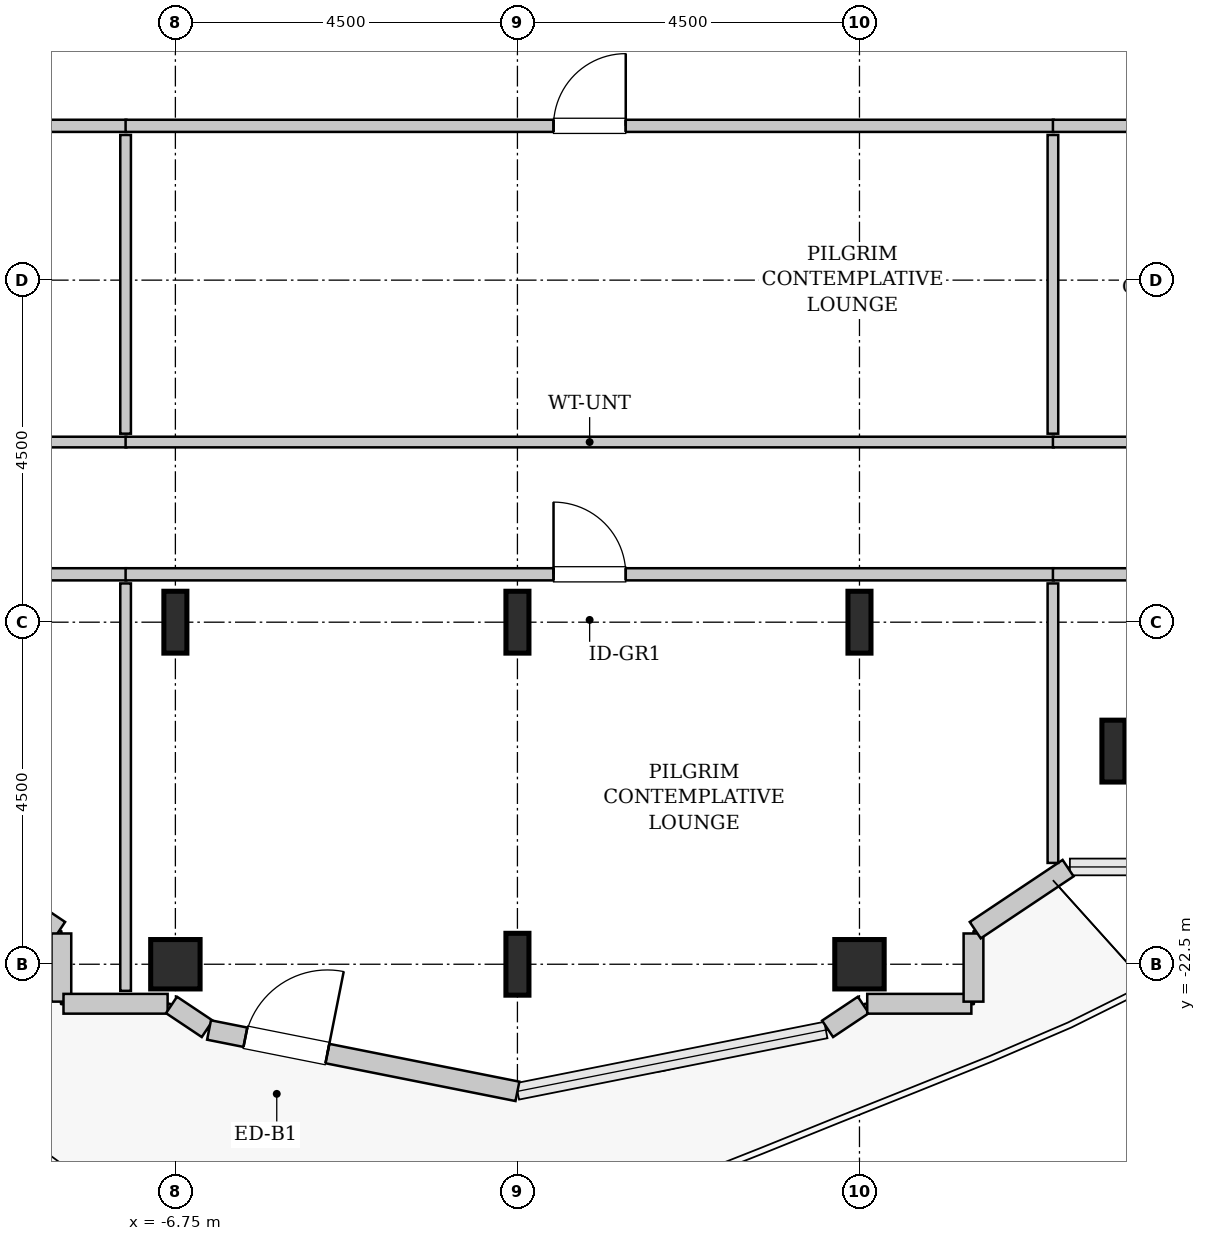
"""IFC4 building model, lengths in metres.
Left out: names, types, materials, properties, quantities, classifications, styles, units other than length and angle.
Written with IfcOpenShell. Run it as: python <this file> out.ifc"""

import sys

from ifc_helpers import new_model, si_unit, direction, frame, frame_2d, origin, origin_2d, place, context, subcontext, project, spatial, rectangle, hollow_rectangle, i_section, extrude, source, transform, mapped, element, fill, save


model = new_model("IFC4")
c1 = context("Model", 3, precision=1e-05, world=origin(), true_north=direction((0.0, 1.0)))
c2 = subcontext(c1, "Body", "Model", "MODEL_VIEW")
j1 = project(units=[si_unit("LENGTHUNIT", "METRE"), si_unit("PLANEANGLEUNIT", "RADIAN")], contexts=[c1])
p1 = place(None, origin())
s1 = spatial("IfcSite", under=j1, at=p1, CompositionType="ELEMENT")
p2 = place(p1, origin())
s2 = spatial("IfcBuilding", under=s1, at=p2, CompositionType="ELEMENT")
p3 = place(p2, frame((0.0, 0.0, 240.8)))
s3 = spatial("IfcBuildingStorey", under=s2, at=p3, CompositionType="ELEMENT", Elevation=240.8)
m1 = source(origin(), c2, "Body", "SweptSolid", [
    extrude(hollow_rectangle(XDim=0.65, YDim=0.65, WallThickness=0.032, InnerFilletRadius=0.032, OuterFilletRadius=0.064, at=origin_2d()), origin(), (0.0, 0.0, 1.0), 3.8),
])
p4 = place(p3, frame((-6.75, -22.5, 0.0), z_axis=(0.0, 0.0, 1.0), x_axis=(1.0, 0.0, 0.0)))
e1 = element("IfcColumn", 1, at=p4, inside=s3, PredefinedType="COLUMN", context=c2, shape_type="MappedRepresentation", body=[
    mapped(m1, transform((0.0, 0.0, 0.0), x_axis=(1.0, 0.0, 0.0), y_axis=(0.0, 1.0, 0.0), z_axis=(0.0, 0.0, 1.0), scale=1.0)),
])
m2 = source(origin(), c2, "Body", "SweptSolid", [
    extrude(i_section(OverallWidth=0.303, OverallDepth=0.814, WebThickness=0.021, FlangeThickness=0.04, FilletRadius=0.03, at=origin_2d()), origin(), (0.0, 0.0, 1.0), 3.8),
])
for number, where, z_axis, x_axis in (
    (2, (-6.75, -18.0, 0.0), (0.0, 0.0, 1.0), (1.0, 0.0, 0.0)),
    (3, (-2.25, -22.5, 0.0), (0.0, 0.0, 1.0), (1.0, 0.0, 0.0)),
    (4, (-2.25, -18.0, 0.0), (0.0, 0.0, 1.0), (1.0, 0.0, 0.0)),
):
    element("IfcColumn", number, at=place(p3, frame(where, z_axis=z_axis, x_axis=x_axis)), inside=s3, PredefinedType="COLUMN", context=c2, shape_type="MappedRepresentation", body=[
        mapped(m2, transform((0.0, 0.0, 0.0), x_axis=(1.0, 0.0, 0.0), y_axis=(0.0, 1.0, 0.0), z_axis=(0.0, 0.0, 1.0), scale=1.0)),
    ])
p5 = place(p3, frame((2.25, -22.5, 0.0), z_axis=(0.0, 0.0, 1.0), x_axis=(1.0, 0.0, 0.0)))
e5 = element("IfcColumn", 5, at=p5, inside=s3, PredefinedType="COLUMN", context=c2, shape_type="MappedRepresentation", body=[
    mapped(m1, transform((0.0, 0.0, 0.0), x_axis=(1.0, 0.0, 0.0), y_axis=(0.0, 1.0, 0.0), z_axis=(0.0, 0.0, 1.0), scale=1.0)),
])
for number, where, z_axis, x_axis in (
    (6, (2.25, -18.0, 0.0), (0.0, 0.0, 1.0), (1.0, 0.0, 0.0)),
    (7, (5.591, -19.696, 0.0), (0.0, 0.0, 1.0), (1.0, 0.0, 0.0)),
):
    element("IfcColumn", number, at=place(p3, frame(where, z_axis=z_axis, x_axis=x_axis)), inside=s3, PredefinedType="COLUMN", context=c2, shape_type="MappedRepresentation", body=[
        mapped(m2, transform((0.0, 0.0, 0.0), x_axis=(1.0, 0.0, 0.0), y_axis=(0.0, 1.0, 0.0), z_axis=(0.0, 0.0, 1.0), scale=1.0)),
    ])
m3 = source(origin(), c2, "Body", "SweptSolid", [
    extrude(rectangle(XDim=1.469, YDim=0.26, at=frame_2d((0.734, 0.0))), origin(), (0.0, 0.0, 1.0), 3.55),
])
p6 = place(p3, frame((-9.495, -21.236, 0.0), z_axis=(0.0, 0.0, 1.0), x_axis=(0.831461760506, -0.555581983884, 0.0)))
e8 = element("IfcWall", 8, at=p6, inside=s3, PredefinedType="SOLIDWALL", context=c2, shape_type="MappedRepresentation", body=[
    mapped(m3, transform((0.0, 0.0, 0.0), x_axis=(1.0, 0.0, 0.0), y_axis=(0.0, 1.0, 0.0), z_axis=(0.0, 0.0, 1.0), scale=1.0)),
])
m4 = source(origin(), c2, "Body", "SweptSolid", [
    extrude(rectangle(XDim=0.897, YDim=0.26, at=frame_2d((0.448, 0.0))), origin(), (0.0, 0.0, 1.0), 3.55),
])
p7 = place(p3, frame((-8.25, -22.095, 0.0), z_axis=(0.0, 0.0, 1.0), x_axis=(0.0, -1.0, 0.0)))
e9 = element("IfcWall", 9, at=p7, inside=s3, PredefinedType="SOLIDWALL", context=c2, shape_type="MappedRepresentation", body=[
    mapped(m4, transform((0.0, 0.0, 0.0), x_axis=(1.0, 0.0, 0.0), y_axis=(0.0, 1.0, 0.0), z_axis=(0.0, 0.0, 1.0), scale=1.0)),
])
m5 = source(origin(), c2, "Body", "SweptSolid", [
    extrude(rectangle(XDim=1.37, YDim=0.26, at=frame_2d((0.685, 0.0))), origin(), (0.0, 0.0, 1.0), 3.55),
])
p8 = place(p3, frame((-8.222, -23.02, 0.0), z_axis=(0.0, 0.0, 1.0), x_axis=(1.0, 0.0, 0.0)))
e10 = element("IfcWall", 10, at=p8, inside=s3, PredefinedType="SOLIDWALL", context=c2, shape_type="MappedRepresentation", body=[
    mapped(m5, transform((0.0, 0.0, 0.0), x_axis=(1.0, 0.0, 0.0), y_axis=(0.0, 1.0, 0.0), z_axis=(0.0, 0.0, 1.0), scale=1.0)),
])
m6 = source(origin(), c2, "Body", "SweptSolid", [
    extrude(rectangle(XDim=0.565, YDim=0.26, at=frame_2d((0.283, 0.0))), origin(), (0.0, 0.0, 1.0), 3.55),
])
p9 = place(p3, frame((-6.801, -23.036, 0.0), z_axis=(0.0, 0.0, 1.0), x_axis=(0.831651492666, -0.555297933317, 0.0)))
e11 = element("IfcWall", 11, at=p9, inside=s3, PredefinedType="SOLIDWALL", context=c2, shape_type="MappedRepresentation", body=[
    mapped(m6, transform((0.0, 0.0, 0.0), x_axis=(1.0, 0.0, 0.0), y_axis=(0.0, 1.0, 0.0), z_axis=(0.0, 0.0, 1.0), scale=1.0)),
])
m7 = source(origin(), c2, "Body", "SweptSolid", [
    extrude(rectangle(XDim=4.137, YDim=0.26, at=frame_2d((2.068, 0.0))), origin(), (0.0, 0.0, 1.0), 3.55),
])
p10 = place(p3, frame((-6.307, -23.365, 0.0), z_axis=(0.0, 0.0, 1.0), x_axis=(0.980782170794, -0.195105954428, 0.0)))
e12 = element("IfcWall", 12, at=p10, inside=s3, PredefinedType="SOLIDWALL", context=c2, shape_type="MappedRepresentation", body=[
    mapped(m7, transform((0.0, 0.0, 0.0), x_axis=(1.0, 0.0, 0.0), y_axis=(0.0, 1.0, 0.0), z_axis=(0.0, 0.0, 1.0), scale=1.0)),
])
p11 = place(p10, frame((0.488, 0.0, 0.0)))
e13 = element("IfcOpeningElement", 13, at=p11, cuts=e12, PredefinedType="OPENING", context=c2, shape_type="SweptSolid", body=[
    extrude(rectangle(XDim=1.1, YDim=2.2, at=frame_2d((0.55, 1.1))), frame((0.0, 0.14, 0.0), z_axis=(0.0, -1.0, 0.0), x_axis=(1.0, 0.0, 0.0)), (0.0, 0.0, 1.0), 0.28),
])
p12 = place(p3, frame((1.831, -23.35, 0.0), z_axis=(0.0, 0.0, 1.0), x_axis=(0.831651492666, 0.555297933317, 0.0)))
e14 = element("IfcWall", 14, at=p12, inside=s3, PredefinedType="SOLIDWALL", context=c2, shape_type="MappedRepresentation", body=[
    mapped(m6, transform((0.0, 0.0, 0.0), x_axis=(1.0, 0.0, 0.0), y_axis=(0.0, 1.0, 0.0), z_axis=(0.0, 0.0, 1.0), scale=1.0)),
])
p13 = place(p3, frame((2.352, -23.02, 0.0), z_axis=(0.0, 0.0, 1.0), x_axis=(1.0, 0.0, 0.0)))
e15 = element("IfcWall", 15, at=p13, inside=s3, PredefinedType="SOLIDWALL", context=c2, shape_type="MappedRepresentation", body=[
    mapped(m5, transform((0.0, 0.0, 0.0), x_axis=(1.0, 0.0, 0.0), y_axis=(0.0, 1.0, 0.0), z_axis=(0.0, 0.0, 1.0), scale=1.0)),
])
p14 = place(p3, frame((3.75, -22.992, 0.0), z_axis=(0.0, 0.0, 1.0), x_axis=(0.0, 1.0, 0.0)))
e16 = element("IfcWall", 16, at=p14, inside=s3, PredefinedType="SOLIDWALL", context=c2, shape_type="MappedRepresentation", body=[
    mapped(m4, transform((0.0, 0.0, 0.0), x_axis=(1.0, 0.0, 0.0), y_axis=(0.0, 1.0, 0.0), z_axis=(0.0, 0.0, 1.0), scale=1.0)),
])
p15 = place(p3, frame((3.773, -22.052, 0.0), z_axis=(0.0, 0.0, 1.0), x_axis=(0.831461760506, 0.555581983884, 0.0)))
e17 = element("IfcWall", 17, at=p15, inside=s3, PredefinedType="SOLIDWALL", context=c2, shape_type="MappedRepresentation", body=[
    mapped(m3, transform((0.0, 0.0, 0.0), x_axis=(1.0, 0.0, 0.0), y_axis=(0.0, 1.0, 0.0), z_axis=(0.0, 0.0, 1.0), scale=1.0)),
])
m8 = source(origin(), c2, "Body", "SweptSolid", [
    extrude(rectangle(XDim=6.225, YDim=0.16, at=frame_2d((3.113, 0.0))), origin(), (0.0, 0.0, 1.0), 3.535),
])
p16 = place(p3, frame((-13.62, -17.37, 0.0), z_axis=(0.0, 0.0, 1.0), x_axis=(1.0, 0.0, 0.0)))
e18 = element("IfcWall", 18, at=p16, inside=s3, PredefinedType="PARTITIONING", context=c2, shape_type="MappedRepresentation", body=[
    mapped(m8, transform((0.0, 0.0, 0.0), x_axis=(1.0, 0.0, 0.0), y_axis=(0.0, 1.0, 0.0), z_axis=(0.0, 0.0, 1.0), scale=1.0)),
])
p17 = place(p16, frame((3.015, 0.0, 0.0)))
e19 = element("IfcOpeningElement", 19, at=p17, cuts=e18, PredefinedType="OPENING", context=c2, shape_type="SweptSolid", body=[
    extrude(rectangle(XDim=0.95, YDim=2.1, at=frame_2d((0.475, 1.05))), frame((0.0, 0.09, 0.0), z_axis=(0.0, -1.0, 0.0), x_axis=(1.0, 0.0, 0.0)), (0.0, 0.0, 1.0), 0.18),
])
m9 = source(origin(), c2, "Body", "SweptSolid", [
    extrude(rectangle(XDim=5.36, YDim=0.14, at=frame_2d((2.68, 0.0))), origin(), (0.0, 0.0, 1.0), 3.535),
])
p18 = place(p3, frame((-7.405, -22.85, 0.0), z_axis=(0.0, 0.0, 1.0), x_axis=(0.0, 1.0, 0.0)))
e20 = element("IfcWall", 20, at=p18, inside=s3, PredefinedType="PARTITIONING", context=c2, shape_type="MappedRepresentation", body=[
    mapped(m9, transform((0.0, 0.0, 0.0), x_axis=(1.0, 0.0, 0.0), y_axis=(0.0, 1.0, 0.0), z_axis=(0.0, 0.0, 1.0), scale=1.0)),
])
m10 = source(origin(), c2, "Body", "SweptSolid", [
    extrude(rectangle(XDim=4.615, YDim=0.16, at=frame_2d((2.308, 0.0))), origin(), (0.0, 0.0, 1.0), 3.535),
])
p19 = place(p3, frame((-12.01, -11.47, 0.0), z_axis=(0.0, 0.0, 1.0), x_axis=(1.0, 0.0, 0.0)))
e21 = element("IfcWall", 21, at=p19, inside=s3, PredefinedType="PARTITIONING", context=c2, shape_type="MappedRepresentation", body=[
    mapped(m10, transform((0.0, 0.0, 0.0), x_axis=(1.0, 0.0, 0.0), y_axis=(0.0, 1.0, 0.0), z_axis=(0.0, 0.0, 1.0), scale=1.0)),
])
p20 = place(p19, frame((1.833, 0.0, 0.0)))
e22 = element("IfcOpeningElement", 22, at=p20, cuts=e21, PredefinedType="OPENING", context=c2, shape_type="SweptSolid", body=[
    extrude(rectangle(XDim=0.95, YDim=2.1, at=frame_2d((0.475, 1.05))), frame((0.0, 0.09, 0.0), z_axis=(0.0, -1.0, 0.0), x_axis=(1.0, 0.0, 0.0)), (0.0, 0.0, 1.0), 0.18),
])
m11 = source(origin(), c2, "Body", "SweptSolid", [
    extrude(rectangle(XDim=4.615, YDim=0.14, at=frame_2d((2.308, 0.0))), origin(), (0.0, 0.0, 1.0), 3.535),
])
p21 = place(p3, frame((-12.01, -15.63, 0.0), z_axis=(0.0, 0.0, 1.0), x_axis=(1.0, 0.0, 0.0)))
e23 = element("IfcWall", 23, at=p21, inside=s3, PredefinedType="PARTITIONING", context=c2, shape_type="MappedRepresentation", body=[
    mapped(m11, transform((0.0, 0.0, 0.0), x_axis=(1.0, 0.0, 0.0), y_axis=(0.0, 1.0, 0.0), z_axis=(0.0, 0.0, 1.0), scale=1.0)),
])
m12 = source(origin(), c2, "Body", "SweptSolid", [
    extrude(rectangle(XDim=3.93, YDim=0.14, at=frame_2d((1.965, 0.0))), origin(), (0.0, 0.0, 1.0), 3.535),
])
p22 = place(p3, frame((-7.405, -15.52, 0.0), z_axis=(0.0, 0.0, 1.0), x_axis=(0.0, 1.0, 0.0)))
e24 = element("IfcWall", 24, at=p22, inside=s3, PredefinedType="PARTITIONING", context=c2, shape_type="MappedRepresentation", body=[
    mapped(m12, transform((0.0, 0.0, 0.0), x_axis=(1.0, 0.0, 0.0), y_axis=(0.0, 1.0, 0.0), z_axis=(0.0, 0.0, 1.0), scale=1.0)),
])
m13 = source(origin(), c2, "Body", "SweptSolid", [
    extrude(rectangle(XDim=12.21, YDim=0.16, at=frame_2d((6.105, 0.0))), origin(), (0.0, 0.0, 1.0), 3.535),
])
p23 = place(p3, frame((-7.405, -17.37, 0.0), z_axis=(0.0, 0.0, 1.0), x_axis=(1.0, 0.0, 0.0)))
e25 = element("IfcWall", 25, at=p23, inside=s3, PredefinedType="PARTITIONING", context=c2, shape_type="MappedRepresentation", body=[
    mapped(m13, transform((0.0, 0.0, 0.0), x_axis=(1.0, 0.0, 0.0), y_axis=(0.0, 1.0, 0.0), z_axis=(0.0, 0.0, 1.0), scale=1.0)),
])
p24 = place(p23, frame((5.63, 0.0, 0.0)))
e26 = element("IfcOpeningElement", 26, at=p24, cuts=e25, PredefinedType="OPENING", context=c2, shape_type="SweptSolid", body=[
    extrude(rectangle(XDim=0.95, YDim=2.1, at=frame_2d((0.475, 1.05))), frame((0.0, 0.09, 0.0), z_axis=(0.0, -1.0, 0.0), x_axis=(1.0, 0.0, 0.0)), (0.0, 0.0, 1.0), 0.18),
])
m14 = source(origin(), c2, "Body", "SweptSolid", [
    extrude(rectangle(XDim=3.677, YDim=0.14, at=frame_2d((1.838, 0.0))), origin(), (0.0, 0.0, 1.0), 3.535),
])
p25 = place(p3, frame((4.795, -21.167, 0.0), z_axis=(0.0, 0.0, 1.0), x_axis=(0.0, 1.0, 0.0)))
e27 = element("IfcWall", 27, at=p25, inside=s3, PredefinedType="PARTITIONING", context=c2, shape_type="MappedRepresentation", body=[
    mapped(m14, transform((0.0, 0.0, 0.0), x_axis=(1.0, 0.0, 0.0), y_axis=(0.0, 1.0, 0.0), z_axis=(0.0, 0.0, 1.0), scale=1.0)),
])
p26 = place(p3, frame((-7.405, -11.47, 0.0), z_axis=(0.0, 0.0, 1.0), x_axis=(1.0, 0.0, 0.0)))
e28 = element("IfcWall", 28, at=p26, inside=s3, PredefinedType="PARTITIONING", context=c2, shape_type="MappedRepresentation", body=[
    mapped(m13, transform((0.0, 0.0, 0.0), x_axis=(1.0, 0.0, 0.0), y_axis=(0.0, 1.0, 0.0), z_axis=(0.0, 0.0, 1.0), scale=1.0)),
])
p27 = place(p26, frame((5.63, 0.0, 0.0)))
e29 = element("IfcOpeningElement", 29, at=p27, cuts=e28, PredefinedType="OPENING", context=c2, shape_type="SweptSolid", body=[
    extrude(rectangle(XDim=0.95, YDim=2.1, at=frame_2d((0.475, 1.05))), frame((0.0, 0.09, 0.0), z_axis=(0.0, -1.0, 0.0), x_axis=(1.0, 0.0, 0.0)), (0.0, 0.0, 1.0), 0.18),
])
m15 = source(origin(), c2, "Body", "SweptSolid", [
    extrude(rectangle(XDim=12.21, YDim=0.14, at=frame_2d((6.105, 0.0))), origin(), (0.0, 0.0, 1.0), 3.535),
])
p28 = place(p3, frame((-7.405, -15.63, 0.0), z_axis=(0.0, 0.0, 1.0), x_axis=(1.0, 0.0, 0.0)))
e30 = element("IfcWall", 30, at=p28, inside=s3, PredefinedType="PARTITIONING", context=c2, shape_type="MappedRepresentation", body=[
    mapped(m15, transform((0.0, 0.0, 0.0), x_axis=(1.0, 0.0, 0.0), y_axis=(0.0, 1.0, 0.0), z_axis=(0.0, 0.0, 1.0), scale=1.0)),
])
p29 = place(p3, frame((4.795, -15.52, 0.0), z_axis=(0.0, 0.0, 1.0), x_axis=(0.0, 1.0, 0.0)))
e31 = element("IfcWall", 31, at=p29, inside=s3, PredefinedType="PARTITIONING", context=c2, shape_type="MappedRepresentation", body=[
    mapped(m12, transform((0.0, 0.0, 0.0), x_axis=(1.0, 0.0, 0.0), y_axis=(0.0, 1.0, 0.0), z_axis=(0.0, 0.0, 1.0), scale=1.0)),
])
m16 = source(origin(), c2, "Body", "SweptSolid", [
    extrude(rectangle(XDim=8.825, YDim=0.16, at=frame_2d((4.413, 0.0))), origin(), (0.0, 0.0, 1.0), 3.535),
])
p30 = place(p3, frame((4.795, -17.37, 0.0), z_axis=(0.0, 0.0, 1.0), x_axis=(1.0, 0.0, 0.0)))
e32 = element("IfcWall", 32, at=p30, inside=s3, PredefinedType="PARTITIONING", context=c2, shape_type="MappedRepresentation", body=[
    mapped(m16, transform((0.0, 0.0, 0.0), x_axis=(1.0, 0.0, 0.0), y_axis=(0.0, 1.0, 0.0), z_axis=(0.0, 0.0, 1.0), scale=1.0)),
])
p31 = place(p30, frame((3.938, 0.0, 0.0)))
e33 = element("IfcOpeningElement", 33, at=p31, cuts=e32, PredefinedType="OPENING", context=c2, shape_type="SweptSolid", body=[
    extrude(rectangle(XDim=0.95, YDim=2.1, at=frame_2d((0.475, 1.05))), frame((0.0, 0.09, 0.0), z_axis=(0.0, -1.0, 0.0), x_axis=(1.0, 0.0, 0.0)), (0.0, 0.0, 1.0), 0.18),
])
m17 = source(origin(), c2, "Body", "SweptSolid", [
    extrude(rectangle(XDim=7.215, YDim=0.16, at=frame_2d((3.607, 0.0))), origin(), (0.0, 0.0, 1.0), 3.535),
])
p32 = place(p3, frame((4.795, -11.47, 0.0), z_axis=(0.0, 0.0, 1.0), x_axis=(1.0, 0.0, 0.0)))
e34 = element("IfcWall", 34, at=p32, inside=s3, PredefinedType="PARTITIONING", context=c2, shape_type="MappedRepresentation", body=[
    mapped(m17, transform((0.0, 0.0, 0.0), x_axis=(1.0, 0.0, 0.0), y_axis=(0.0, 1.0, 0.0), z_axis=(0.0, 0.0, 1.0), scale=1.0)),
])
p33 = place(p32, frame((3.133, 0.0, 0.0)))
e35 = element("IfcOpeningElement", 35, at=p33, cuts=e34, PredefinedType="OPENING", context=c2, shape_type="SweptSolid", body=[
    extrude(rectangle(XDim=0.95, YDim=2.1, at=frame_2d((0.475, 1.05))), frame((0.0, 0.09, 0.0), z_axis=(0.0, -1.0, 0.0), x_axis=(1.0, 0.0, 0.0)), (0.0, 0.0, 1.0), 0.18),
])
m18 = source(origin(), c2, "Body", "SweptSolid", [
    extrude(rectangle(XDim=7.215, YDim=0.14, at=frame_2d((3.607, 0.0))), origin(), (0.0, 0.0, 1.0), 3.535),
])
p34 = place(p3, frame((4.795, -15.63, 0.0), z_axis=(0.0, 0.0, 1.0), x_axis=(1.0, 0.0, 0.0)))
e36 = element("IfcWall", 36, at=p34, inside=s3, PredefinedType="PARTITIONING", context=c2, shape_type="MappedRepresentation", body=[
    mapped(m18, transform((0.0, 0.0, 0.0), x_axis=(1.0, 0.0, 0.0), y_axis=(0.0, 1.0, 0.0), z_axis=(0.0, 0.0, 1.0), scale=1.0)),
])
m19 = source(origin(), c2, "Body", "SweptSolid", [
    extrude(rectangle(XDim=1.1, YDim=2.2, at=frame_2d((0.55, 1.1))), frame((0.0, 0.025, 0.0), z_axis=(0.0, -1.0, 0.0), x_axis=(1.0, 0.0, 0.0)), (0.0, 0.0, 1.0), 0.05),
])
p35 = place(p11, origin())
e37 = element("IfcDoor", 37, at=p35, inside=s3, OperationType="SINGLE_SWING_RIGHT", PredefinedType="DOOR", context=c2, shape_type="MappedRepresentation", body=[
    mapped(m19, transform((0.0, 0.0, 0.0), x_axis=(1.0, 0.0, 0.0), y_axis=(0.0, 1.0, 0.0), z_axis=(0.0, 0.0, 1.0), scale=1.0)),
])
fill(e13, e37)
m20 = source(origin(), c2, "Body", "SweptSolid", [
    extrude(rectangle(XDim=0.95, YDim=2.1, at=frame_2d((0.475, 1.05))), frame((0.0, 0.025, 0.0), z_axis=(0.0, -1.0, 0.0), x_axis=(1.0, 0.0, 0.0)), (0.0, 0.0, 1.0), 0.05),
])
p36 = place(p24, origin())
e38 = element("IfcDoor", 38, at=p36, inside=s3, OperationType="SINGLE_SWING_LEFT", PredefinedType="DOOR", context=c2, shape_type="MappedRepresentation", body=[
    mapped(m20, transform((0.0, 0.0, 0.0), x_axis=(1.0, 0.0, 0.0), y_axis=(0.0, 1.0, 0.0), z_axis=(0.0, 0.0, 1.0), scale=1.0)),
])
fill(e26, e38)
p37 = place(p27, origin())
e39 = element("IfcDoor", 39, at=p37, inside=s3, OperationType="SINGLE_SWING_RIGHT", PredefinedType="DOOR", context=c2, shape_type="MappedRepresentation", body=[
    mapped(m20, transform((0.0, 0.0, 0.0), x_axis=(1.0, 0.0, 0.0), y_axis=(0.0, 1.0, 0.0), z_axis=(0.0, 0.0, 1.0), scale=1.0)),
])
fill(e29, e39)
save(model, sys.argv[1])
